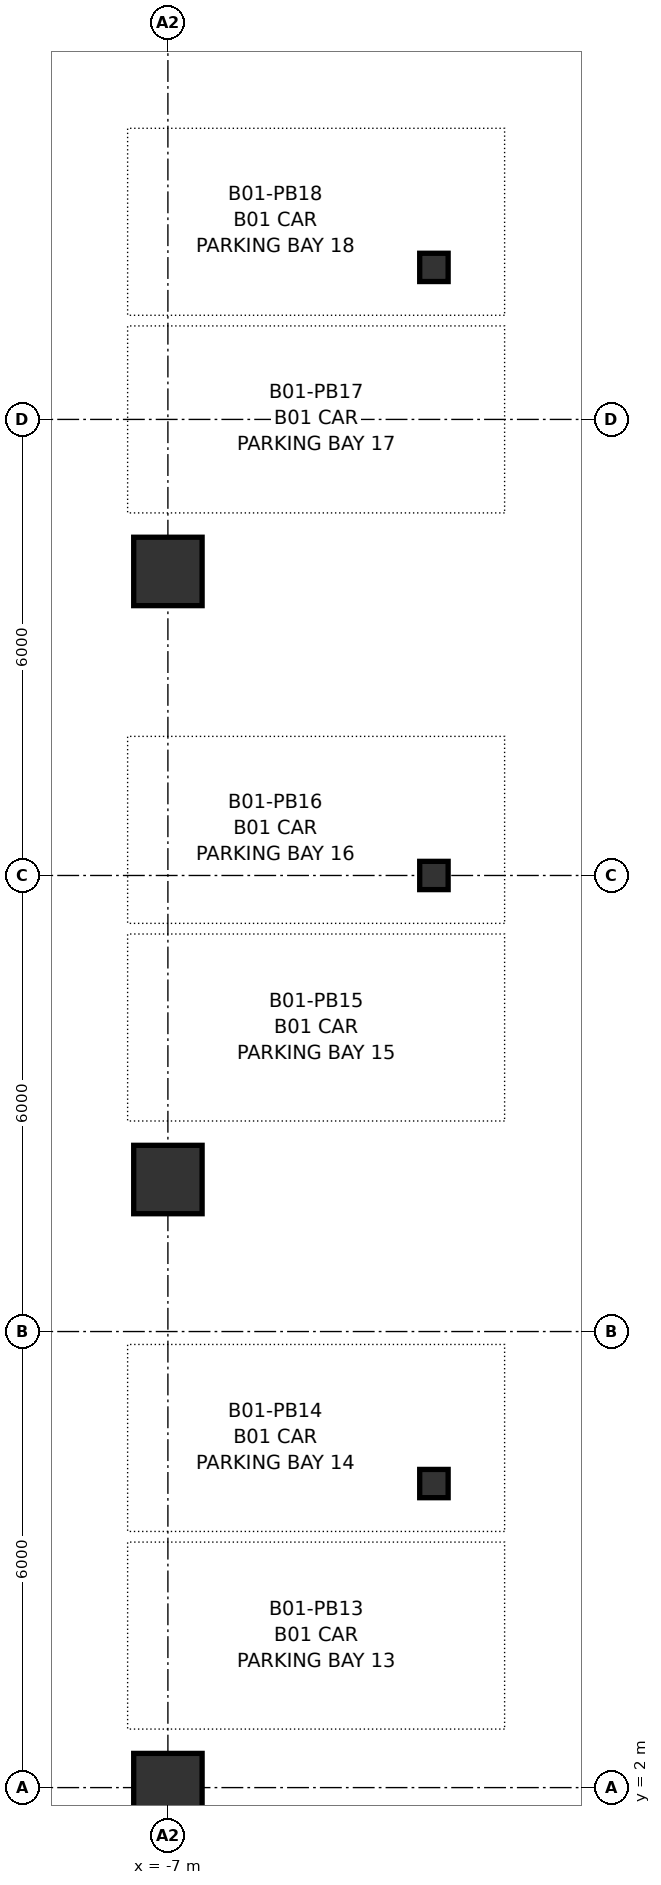
"""IFC4 building model, lengths in metres.
Left out: names, types, materials, properties, quantities, classifications, styles, units other than length and angle.
Written with IfcOpenShell. Run it as: python <this file> out.ifc"""

import sys

from ifc_helpers import new_model, si_unit, direction, frame, origin, origin_2d, place, context, subcontext, project, spatial, rectangle, i_section, extrude, source, transform, mapped, element, save


model = new_model("IFC4")
c1 = context("Model", 3, precision=1e-05, world=origin(), true_north=direction((0.0, 1.0)))
c2 = subcontext(c1, "Body", "Model", "MODEL_VIEW")
j1 = project(units=[si_unit("LENGTHUNIT", "METRE"), si_unit("PLANEANGLEUNIT", "RADIAN")], contexts=[c1])
p1 = place(None, origin())
s1 = spatial("IfcSite", under=j1, at=p1, CompositionType="ELEMENT")
p2 = place(p1, origin())
s2 = spatial("IfcBuilding", under=s1, at=p2, CompositionType="ELEMENT")
p3 = place(p2, frame((0.0, 0.0, -4.2)))
s3 = spatial("IfcBuildingStorey", under=s2, at=p3, CompositionType="ELEMENT", Elevation=-4.2)
m1 = source(origin(), c2, "Body", "SweptSolid", [
    extrude(i_section(OverallWidth=0.374, OverallDepth=0.372, WebThickness=0.016, FlangeThickness=0.026, FilletRadius=0.015, at=origin_2d()), origin(), (0.0, 0.0, 1.0), 3.9),
])
for number, where, z_axis, x_axis in (
    (1, (-3.5, 6.0, 0.0), (0.0, 0.0, 1.0), (1.0, 0.0, 0.0)),
    (2, (-3.5, 14.0, 0.0), (0.0, 0.0, 1.0), (1.0, 0.0, 0.0)),
    (3, (-3.5, 22.0, 0.0), (0.0, 0.0, 1.0), (1.0, 0.0, 0.0)),
):
    element("IfcColumn", number, at=place(p3, frame(where, z_axis=z_axis, x_axis=x_axis)), inside=s3, PredefinedType="PILASTER", context=c2, shape_type="MappedRepresentation", body=[
        mapped(m1, transform((0.0, 0.0, 0.0), x_axis=(1.0, 0.0, 0.0), y_axis=(0.0, 1.0, 0.0), z_axis=(0.0, 0.0, 1.0), scale=1.0)),
    ])
m2 = source(origin(), c2, "Body", "SweptSolid", [
    extrude(rectangle(XDim=0.9, YDim=0.9, at=origin_2d()), origin(), (0.0, 0.0, 1.0), 3.985),
])
for number, where, z_axis, x_axis in (
    (4, (-7.0, 2.0, 0.0), (0.0, 0.0, 1.0), (1.0, 0.0, 0.0)),
    (5, (-7.0, 10.0, 0.0), (0.0, 0.0, 1.0), (1.0, 0.0, 0.0)),
    (6, (-7.0, 18.0, 0.0), (0.0, 0.0, 1.0), (1.0, 0.0, 0.0)),
):
    element("IfcColumn", number, at=place(p3, frame(where, z_axis=z_axis, x_axis=x_axis)), inside=s3, PredefinedType="COLUMN", context=c2, shape_type="MappedRepresentation", body=[
        mapped(m2, transform((0.0, 0.0, 0.0), x_axis=(1.0, 0.0, 0.0), y_axis=(0.0, 1.0, 0.0), z_axis=(0.0, 0.0, 1.0), scale=1.0)),
    ])
save(model, sys.argv[1])
